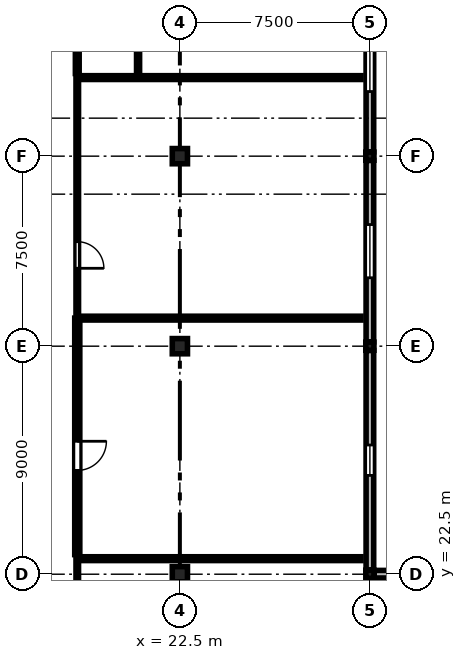
"""IFC4 building model, lengths in metres.
Left out: names, types, materials, properties, quantities, classifications, styles, units other than length and angle.
Written with IfcOpenShell. Run it as: python <this file> out.ifc"""

import sys

from ifc_helpers import new_model, si_unit, direction, frame, frame_2d, origin, origin_2d, place, context, subcontext, project, spatial, rectangle, circle, extrude, element, fill, save


model = new_model("IFC4")
c1 = context("Model", 3, precision=1e-05, world=origin(), true_north=direction((0.0, 1.0)))
c2 = subcontext(c1, "Body", "Model", "MODEL_VIEW")
j1 = project(units=[si_unit("LENGTHUNIT", "METRE"), si_unit("PLANEANGLEUNIT", "RADIAN")], contexts=[c1])
p1 = place(None, origin())
s1 = spatial("IfcSite", under=j1, at=p1, CompositionType="ELEMENT")
p2 = place(p1, origin())
s2 = spatial("IfcBuilding", under=s1, at=p2, CompositionType="ELEMENT")
p3 = place(p2, frame((0.0, 0.0, 21.9)))
s3 = spatial("IfcBuildingStorey", under=s2, at=p3, CompositionType="ELEMENT", Elevation=21.9)
p4 = place(p3, frame((22.5, 22.5, 0.0), z_axis=(0.0, 0.0, 1.0), x_axis=(1.0, 0.0, 0.0)))
e1 = element("IfcColumn", 1, at=p4, inside=s3, PredefinedType="COLUMN", context=c2, shape_type="SweptSolid", body=[
    extrude(circle(Radius=0.3, at=origin_2d()), origin(), (0.0, 0.0, 1.0), 4.05),
])
for number, where, z_axis, x_axis in (
    (2, (22.5, 31.5, 0.0), (0.0, 0.0, 1.0), (1.0, 0.0, 0.0)),
    (3, (22.5, 39.0, 0.0), (0.0, 0.0, 1.0), (1.0, 0.0, 0.0)),
):
    element("IfcColumn", number, at=place(p3, frame(where, z_axis=z_axis, x_axis=x_axis)), inside=s3, PredefinedType="COLUMN", context=c2, shape_type="SweptSolid", body=[
        extrude(rectangle(XDim=0.6, YDim=0.6, at=origin_2d()), origin(), (0.0, 0.0, 1.0), 4.05),
    ])
for number, where, z_axis, x_axis in (
    (4, (30.0, 22.5, 0.0), (0.0, 0.0, 1.0), (1.0, 0.0, 0.0)),
    (5, (30.0, 31.5, 0.0), (0.0, 0.0, 1.0), (1.0, 0.0, 0.0)),
    (6, (30.0, 39.0, 0.0), (0.0, 0.0, 1.0), (1.0, 0.0, 0.0)),
):
    element("IfcColumn", number, at=place(p3, frame(where, z_axis=z_axis, x_axis=x_axis)), inside=s3, PredefinedType="COLUMN", context=c2, shape_type="SweptSolid", body=[
        extrude(rectangle(XDim=0.32, YDim=0.32, at=origin_2d()), origin(), (0.0, 0.0, 1.0), 4.05),
    ])
p5 = place(p3, frame((30.0, 31.33, 0.0), z_axis=(0.0, 0.0, 1.0), x_axis=(0.0, -1.0, 0.0)))
e7 = element("IfcWall", 7, at=p5, inside=s3, PredefinedType="STANDARD", context=c2, shape_type="SweptSolid", body=[
    extrude(rectangle(XDim=8.66, YDim=0.3, at=frame_2d((4.33, 0.0))), origin(), (0.0, 0.0, 1.0), 3.22),
])
p6 = place(p5, frame((3.73, 0.0, 0.9)))
e8 = element("IfcOpeningElement", 8, at=p6, cuts=e7, PredefinedType="OPENING", context=c2, shape_type="SweptSolid", body=[
    extrude(rectangle(XDim=1.2, YDim=2.04, at=frame_2d((0.6, 1.02))), frame((0.0, 0.16, 0.0), z_axis=(0.0, -1.0, 0.0), x_axis=(1.0, 0.0, 0.0)), (0.0, 0.0, 1.0), 0.32),
])
p7 = place(p3, frame((30.0, 38.83, 0.0), z_axis=(0.0, 0.0, 1.0), x_axis=(0.0, -1.0, 0.0)))
e9 = element("IfcWall", 9, at=p7, inside=s3, PredefinedType="STANDARD", context=c2, shape_type="SweptSolid", body=[
    extrude(rectangle(XDim=7.16, YDim=0.3, at=frame_2d((3.58, 0.0))), origin(), (0.0, 0.0, 1.0), 3.17),
])
p8 = place(p7, frame((2.53, 0.0, 0.9)))
e10 = element("IfcOpeningElement", 10, at=p8, cuts=e9, PredefinedType="OPENING", context=c2, shape_type="SweptSolid", body=[
    extrude(rectangle(XDim=2.1, YDim=1.99, at=frame_2d((1.05, 0.995))), frame((0.0, 0.16, 0.0), z_axis=(0.0, -1.0, 0.0), x_axis=(1.0, 0.0, 0.0)), (0.0, 0.0, 1.0), 0.32),
])
p9 = place(p3, frame((30.0, 46.33, 0.0), z_axis=(0.0, 0.0, 1.0), x_axis=(0.0, -1.0, 0.0)))
e11 = element("IfcWall", 11, at=p9, inside=s3, PredefinedType="STANDARD", context=c2, shape_type="SweptSolid", body=[
    extrude(rectangle(XDim=7.16, YDim=0.3, at=frame_2d((3.58, 0.0))), origin(), (0.0, 0.0, 1.0), 3.17),
])
p10 = place(p9, frame((2.38, 0.0, 0.9)))
e12 = element("IfcOpeningElement", 12, at=p10, cuts=e11, PredefinedType="OPENING", context=c2, shape_type="SweptSolid", body=[
    extrude(rectangle(XDim=2.4, YDim=1.99, at=frame_2d((1.2, 0.995))), frame((0.0, 0.16, 0.0), z_axis=(0.0, -1.0, 0.0), x_axis=(1.0, 0.0, 0.0)), (0.0, 0.0, 1.0), 0.32),
])
p11 = place(p3, frame((30.17, 22.5, 0.0), z_axis=(0.0, 0.0, 1.0), x_axis=(1.0, 0.0, 0.0)))
e13 = element("IfcWall", 13, at=p11, inside=s3, PredefinedType="STANDARD", context=c2, shape_type="SweptSolid", body=[
    extrude(rectangle(XDim=7.18, YDim=0.3, at=frame_2d((3.59, 0.0))), origin(), (0.0, 0.0, 1.0), 3.17),
])
p12 = place(p11, frame((2.99, 0.0, 0.9)))
e14 = element("IfcOpeningElement", 14, at=p12, cuts=e13, PredefinedType="OPENING", context=c2, shape_type="SweptSolid", body=[
    extrude(rectangle(XDim=1.2, YDim=1.99, at=frame_2d((0.6, 0.995))), frame((0.0, 0.16, 0.0), z_axis=(0.0, -1.0, 0.0), x_axis=(1.0, 0.0, 0.0)), (0.0, 0.0, 1.0), 0.32),
])
p13 = place(p3, frame((18.45, 23.114, 0.0), z_axis=(0.0, 0.0, 1.0), x_axis=(0.0, -1.0, 0.0)))
e15 = element("IfcWall", 15, at=p13, inside=s3, PredefinedType="PARTITIONING", context=c2, shape_type="SweptSolid", body=[
    extrude(rectangle(XDim=9.334, YDim=0.1, at=frame_2d((4.667, 0.0))), origin(), (0.0, 0.0, 1.0), 3.355),
])
p14 = place(p13, frame((4.092, 0.0, 0.0)))
e16 = element("IfcOpeningElement", 16, at=p14, cuts=e15, PredefinedType="OPENING", context=c2, shape_type="SweptSolid", body=[
    extrude(rectangle(XDim=1.15, YDim=2.2, at=frame_2d((0.575, 1.1))), frame((0.0, 0.06, 0.0), z_axis=(0.0, -1.0, 0.0), x_axis=(1.0, 0.0, 0.0)), (0.0, 0.0, 1.0), 0.12),
])
p15 = place(p3, frame((18.45, 32.607, 0.0), z_axis=(0.0, 0.0, 1.0), x_axis=(0.0, -1.0, 0.0)))
e17 = element("IfcWall", 17, at=p15, inside=s3, PredefinedType="STANDARD", context=c2, shape_type="SweptSolid", body=[
    extrude(rectangle(XDim=9.334, YDim=0.2, at=frame_2d((4.667, 0.0))), origin(), (0.0, 0.0, 1.0), 3.355),
])
p16 = place(p15, frame((4.86, 0.0, 0.0)))
e18 = element("IfcOpeningElement", 18, at=p16, cuts=e17, PredefinedType="OPENING", context=c2, shape_type="SweptSolid", body=[
    extrude(rectangle(XDim=1.15, YDim=2.2, at=frame_2d((0.575, 1.1))), frame((0.0, 0.11, 0.0), z_axis=(0.0, -1.0, 0.0), x_axis=(1.0, 0.0, 0.0)), (0.0, 0.0, 1.0), 0.22),
])
p17 = place(p3, frame((18.45, 42.101, 0.0), z_axis=(0.0, 0.0, 1.0), x_axis=(0.0, -1.0, 0.0)))
e19 = element("IfcWall", 19, at=p17, inside=s3, PredefinedType="PARTITIONING", context=c2, shape_type="SweptSolid", body=[
    extrude(rectangle(XDim=9.334, YDim=0.1, at=frame_2d((4.667, 0.0))), origin(), (0.0, 0.0, 1.0), 3.755),
])
p18 = place(p17, frame((6.477, 0.0, 0.0)))
e20 = element("IfcOpeningElement", 20, at=p18, cuts=e19, PredefinedType="OPENING", context=c2, shape_type="SweptSolid", body=[
    extrude(rectangle(XDim=1.05, YDim=2.2, at=frame_2d((0.525, 1.1))), frame((0.0, 0.06, 0.0), z_axis=(0.0, -1.0, 0.0), x_axis=(1.0, 0.0, 0.0)), (0.0, 0.0, 1.0), 0.12),
])
p19 = place(p3, frame((18.45, 51.595, 0.0), z_axis=(0.0, 0.0, 1.0), x_axis=(0.0, -1.0, 0.0)))
e21 = element("IfcWall", 21, at=p19, inside=s3, PredefinedType="PARTITIONING", context=c2, shape_type="SweptSolid", body=[
    extrude(rectangle(XDim=9.334, YDim=0.15, at=frame_2d((4.667, 0.0))), origin(), (0.0, 0.0, 1.0), 3.755),
])
p20 = place(p19, frame((0.998, 0.0, 0.0)))
e22 = element("IfcOpeningElement", 22, at=p20, cuts=e21, PredefinedType="OPENING", context=c2, shape_type="SweptSolid", body=[
    extrude(rectangle(XDim=1.35, YDim=2.25, at=frame_2d((0.675, 1.125))), frame((0.0, 0.085, 0.0), z_axis=(0.0, -1.0, 0.0), x_axis=(1.0, 0.0, 0.0)), (0.0, 0.0, 1.0), 0.17),
])
p21 = place(p3, frame((20.85, 42.261, 0.0), z_axis=(0.0, 0.0, 1.0), x_axis=(0.0, 1.0, 0.0)))
e23 = element("IfcWall", 23, at=p21, inside=s3, PredefinedType="PARTITIONING", context=c2, shape_type="SweptSolid", body=[
    extrude(rectangle(XDim=2.0, YDim=0.12, at=frame_2d((1.0, 0.0))), origin(), (0.0, 0.0, 1.0), 3.755),
])
for number, where, z_axis, x_axis in (
    (24, (18.45, 23.114, 0.0), (0.0, 0.0, 1.0), (1.0, 0.0, 0.0)),
    (25, (18.45, 32.607, 0.0), (0.0, 0.0, 1.0), (1.0, 0.0, 0.0)),
    (26, (18.45, 42.101, 0.0), (0.0, 0.0, 1.0), (1.0, 0.0, 0.0)),
):
    element("IfcWall", number, at=place(p3, frame(where, z_axis=z_axis, x_axis=x_axis)), inside=s3, PredefinedType="PARTITIONING", context=c2, shape_type="SweptSolid", body=[
        extrude(rectangle(XDim=11.2, YDim=0.15, at=frame_2d((5.6, 0.0))), origin(), (0.0, 0.0, 1.0), 3.755),
    ])
p22 = place(p6, origin())
e27 = element("IfcWindow", 27, at=p22, inside=s3, PartitioningType="SINGLE_PANEL", PredefinedType="WINDOW", context=c2, shape_type="SweptSolid", body=[
    extrude(rectangle(XDim=1.2, YDim=2.04, at=frame_2d((0.6, 1.02))), frame((0.0, 0.03, 0.0), z_axis=(0.0, -1.0, 0.0), x_axis=(1.0, 0.0, 0.0)), (0.0, 0.0, 1.0), 0.06),
])
fill(e8, e27)
p23 = place(p8, origin())
e28 = element("IfcWindow", 28, at=p23, inside=s3, PartitioningType="SINGLE_PANEL", PredefinedType="WINDOW", context=c2, shape_type="SweptSolid", body=[
    extrude(rectangle(XDim=2.1, YDim=1.99, at=frame_2d((1.05, 0.995))), frame((0.0, 0.03, 0.0), z_axis=(0.0, -1.0, 0.0), x_axis=(1.0, 0.0, 0.0)), (0.0, 0.0, 1.0), 0.06),
])
fill(e10, e28)
p24 = place(p10, origin())
e29 = element("IfcWindow", 29, at=p24, inside=s3, PartitioningType="SINGLE_PANEL", PredefinedType="WINDOW", context=c2, shape_type="SweptSolid", body=[
    extrude(rectangle(XDim=2.4, YDim=1.99, at=frame_2d((1.2, 0.995))), frame((0.0, 0.03, 0.0), z_axis=(0.0, -1.0, 0.0), x_axis=(1.0, 0.0, 0.0)), (0.0, 0.0, 1.0), 0.06),
])
fill(e12, e29)
p25 = place(p16, origin())
e30 = element("IfcDoor", 30, at=p25, inside=s3, OperationType="SINGLE_SWING_LEFT", PredefinedType="DOOR", context=c2, shape_type="SweptSolid", body=[
    extrude(rectangle(XDim=1.15, YDim=2.2, at=frame_2d((0.575, 1.1))), frame((0.0, 0.025, 0.0), z_axis=(0.0, -1.0, 0.0), x_axis=(1.0, 0.0, 0.0)), (0.0, 0.0, 1.0), 0.05),
])
fill(e18, e30)
p26 = place(p18, origin())
e31 = element("IfcDoor", 31, at=p26, inside=s3, OperationType="SINGLE_SWING_RIGHT", PredefinedType="DOOR", context=c2, shape_type="SweptSolid", body=[
    extrude(rectangle(XDim=1.05, YDim=2.2, at=frame_2d((0.525, 1.1))), frame((0.0, 0.025, 0.0), z_axis=(0.0, -1.0, 0.0), x_axis=(1.0, 0.0, 0.0)), (0.0, 0.0, 1.0), 0.05),
])
fill(e20, e31)
save(model, sys.argv[1])
